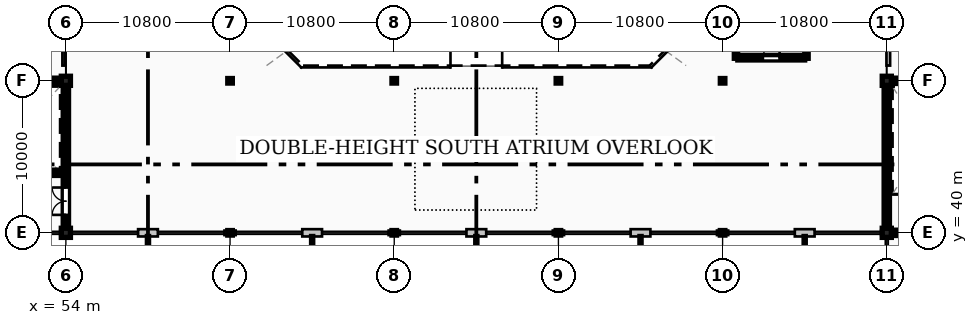
"""IFC4 building model, lengths in metres.
Left out: names, types, materials, properties, quantities, classifications, styles, units other than length and angle.
Written with IfcOpenShell. Run it as: python <this file> out.ifc"""

import sys

from ifc_helpers import new_model, si_unit, direction, frame, frame_2d, origin, origin_2d, place, context, subcontext, project, spatial, rectangle, hollow_rectangle, extrude, element, fill, save


model = new_model("IFC4")
c1 = context("Model", 3, precision=1e-05, world=origin(), true_north=direction((0.0, 1.0)))
c2 = subcontext(c1, "Body", "Model", "MODEL_VIEW")
j1 = project(units=[si_unit("LENGTHUNIT", "METRE"), si_unit("PLANEANGLEUNIT", "RADIAN")], contexts=[c1])
p1 = place(None, origin())
s1 = spatial("IfcSite", under=j1, at=p1, CompositionType="ELEMENT")
p2 = place(p1, origin())
s2 = spatial("IfcBuilding", under=s1, at=p2, CompositionType="ELEMENT")
p3 = place(p2, frame((0.0, 0.0, 14.4)))
s3 = spatial("IfcBuildingStorey", under=s2, at=p3, CompositionType="ELEMENT", Elevation=14.4)
for number, where, z_axis, x_axis in (
    (1, (54.0, 40.0, 0.0), (0.0, 0.0, 1.0), (1.0, 0.0, 0.0)),
    (2, (54.0, 50.0, 0.0), (0.0, 0.0, 1.0), (1.0, 0.0, 0.0)),
):
    element("IfcColumn", number, at=place(p3, frame(where, z_axis=z_axis, x_axis=x_axis)), inside=s3, PredefinedType="COLUMN", context=c2, shape_type="SweptSolid", body=[
        extrude(rectangle(XDim=0.6, YDim=0.6, at=origin_2d()), origin(), (0.0, 0.0, 1.0), 9.6),
    ])
for number, where, z_axis, x_axis in (
    (3, (64.8, 40.0, 0.0), (0.0, 0.0, 1.0), (1.0, 0.0, 0.0)),
    (4, (64.8, 50.0, 0.0), (0.0, 0.0, 1.0), (1.0, 0.0, 0.0)),
    (5, (75.6, 40.0, 0.0), (0.0, 0.0, 1.0), (1.0, 0.0, 0.0)),
    (6, (75.6, 50.0, 0.0), (0.0, 0.0, 1.0), (1.0, 0.0, 0.0)),
    (7, (86.4, 40.0, 0.0), (0.0, 0.0, 1.0), (1.0, 0.0, 0.0)),
    (8, (86.4, 50.0, 0.0), (0.0, 0.0, 1.0), (1.0, 0.0, 0.0)),
    (9, (97.2, 40.0, 0.0), (0.0, 0.0, 1.0), (1.0, 0.0, 0.0)),
    (10, (97.2, 50.0, 0.0), (0.0, 0.0, 1.0), (1.0, 0.0, 0.0)),
):
    element("IfcColumn", number, at=place(p3, frame(where, z_axis=z_axis, x_axis=x_axis)), inside=s3, PredefinedType="COLUMN", context=c2, shape_type="SweptSolid", body=[
        extrude(hollow_rectangle(XDim=0.3, YDim=0.3, WallThickness=0.016, InnerFilletRadius=0.016, OuterFilletRadius=0.032, at=origin_2d()), origin(), (0.0, 0.0, 1.0), 9.6),
    ])
for number, where, z_axis, x_axis in (
    (11, (108.0, 40.0, 0.0), (0.0, 0.0, 1.0), (1.0, 0.0, 0.0)),
    (12, (108.0, 50.0, 0.0), (0.0, 0.0, 1.0), (1.0, 0.0, 0.0)),
):
    element("IfcColumn", number, at=place(p3, frame(where, z_axis=z_axis, x_axis=x_axis)), inside=s3, PredefinedType="COLUMN", context=c2, shape_type="SweptSolid", body=[
        extrude(rectangle(XDim=0.6, YDim=0.6, at=origin_2d()), origin(), (0.0, 0.0, 1.0), 9.6),
    ])
for number, where, z_axis, x_axis in (
    (13, (108.0, 39.855, 0.0), (0.0, 0.0, 1.0), (0.0, -1.0, 0.0)),
    (14, (53.63, 40.0, 0.0), (0.0, 0.0, 1.0), (1.0, 0.0, 0.0)),
):
    element("IfcWall", number, at=place(p3, frame(where, z_axis=z_axis, x_axis=x_axis)), inside=s3, PredefinedType="STANDARD", context=c2, shape_type="SweptSolid", body=[
        extrude(rectangle(XDim=0.225, YDim=0.3, at=frame_2d((0.113, 0.0))), origin(), (0.0, 0.0, 1.0), 9.36),
    ])
p4 = place(p3, frame((58.75, 40.0, 0.0), z_axis=(0.0, 0.0, 1.0), x_axis=(1.0, 0.0, 0.0)))
e15 = element("IfcWall", 15, at=p4, inside=s3, PredefinedType="STANDARD", context=c2, shape_type="SweptSolid", body=[
    extrude(rectangle(XDim=1.3, YDim=0.48, at=frame_2d((0.65, 0.0))), origin(), (0.0, 0.0, 1.0), 8.96),
])
for number, where, z_axis, x_axis in (
    (16, (54.145, 40.0, 0.0), (0.0, 0.0, 1.0), (1.0, 0.0, 0.0)),
    (17, (64.43, 40.0, 0.0), (0.0, 0.0, 1.0), (1.0, 0.0, 0.0)),
):
    element("IfcWall", number, at=place(p3, frame(where, z_axis=z_axis, x_axis=x_axis)), inside=s3, PredefinedType="STANDARD", context=c2, shape_type="SweptSolid", body=[
        extrude(rectangle(XDim=0.225, YDim=0.3, at=frame_2d((0.113, 0.0))), origin(), (0.0, 0.0, 1.0), 9.36),
    ])
p5 = place(p3, frame((69.55, 40.0, 0.0), z_axis=(0.0, 0.0, 1.0), x_axis=(1.0, 0.0, 0.0)))
e18 = element("IfcWall", 18, at=p5, inside=s3, PredefinedType="STANDARD", context=c2, shape_type="SweptSolid", body=[
    extrude(rectangle(XDim=1.3, YDim=0.48, at=frame_2d((0.65, 0.0))), origin(), (0.0, 0.0, 1.0), 8.96),
])
p6 = place(p3, frame((64.945, 40.0, 0.0), z_axis=(0.0, 0.0, 1.0), x_axis=(1.0, 0.0, 0.0)))
e19 = element("IfcWall", 19, at=p6, inside=s3, PredefinedType="STANDARD", context=c2, shape_type="SweptSolid", body=[
    extrude(rectangle(XDim=0.225, YDim=0.3, at=frame_2d((0.112, 0.0))), origin(), (0.0, 0.0, 1.0), 9.36),
])
p7 = place(p3, frame((75.23, 40.0, 0.0), z_axis=(0.0, 0.0, 1.0), x_axis=(1.0, 0.0, 0.0)))
e20 = element("IfcWall", 20, at=p7, inside=s3, PredefinedType="STANDARD", context=c2, shape_type="SweptSolid", body=[
    extrude(rectangle(XDim=0.225, YDim=0.3, at=frame_2d((0.113, 0.0))), origin(), (0.0, 0.0, 1.0), 9.36),
])
p8 = place(p3, frame((80.35, 40.0, 0.0), z_axis=(0.0, 0.0, 1.0), x_axis=(1.0, 0.0, 0.0)))
e21 = element("IfcWall", 21, at=p8, inside=s3, PredefinedType="STANDARD", context=c2, shape_type="SweptSolid", body=[
    extrude(rectangle(XDim=1.3, YDim=0.48, at=frame_2d((0.65, 0.0))), origin(), (0.0, 0.0, 1.0), 8.96),
])
for number, where, z_axis, x_axis in (
    (22, (75.745, 40.0, 0.0), (0.0, 0.0, 1.0), (1.0, 0.0, 0.0)),
    (23, (86.03, 40.0, 0.0), (0.0, 0.0, 1.0), (1.0, 0.0, 0.0)),
):
    element("IfcWall", number, at=place(p3, frame(where, z_axis=z_axis, x_axis=x_axis)), inside=s3, PredefinedType="STANDARD", context=c2, shape_type="SweptSolid", body=[
        extrude(rectangle(XDim=0.225, YDim=0.3, at=frame_2d((0.112, 0.0))), origin(), (0.0, 0.0, 1.0), 9.36),
    ])
p9 = place(p3, frame((91.15, 40.0, 0.0), z_axis=(0.0, 0.0, 1.0), x_axis=(1.0, 0.0, 0.0)))
e24 = element("IfcWall", 24, at=p9, inside=s3, PredefinedType="STANDARD", context=c2, shape_type="SweptSolid", body=[
    extrude(rectangle(XDim=1.3, YDim=0.48, at=frame_2d((0.65, 0.0))), origin(), (0.0, 0.0, 1.0), 8.96),
])
p10 = place(p3, frame((86.545, 40.0, 0.0), z_axis=(0.0, 0.0, 1.0), x_axis=(1.0, 0.0, 0.0)))
e25 = element("IfcWall", 25, at=p10, inside=s3, PredefinedType="STANDARD", context=c2, shape_type="SweptSolid", body=[
    extrude(rectangle(XDim=0.225, YDim=0.3, at=frame_2d((0.113, 0.0))), origin(), (0.0, 0.0, 1.0), 9.36),
])
p11 = place(p3, frame((96.83, 40.0, 0.0), z_axis=(0.0, 0.0, 1.0), x_axis=(1.0, 0.0, 0.0)))
e26 = element("IfcWall", 26, at=p11, inside=s3, PredefinedType="STANDARD", context=c2, shape_type="SweptSolid", body=[
    extrude(rectangle(XDim=0.225, YDim=0.3, at=frame_2d((0.112, 0.0))), origin(), (0.0, 0.0, 1.0), 9.36),
])
p12 = place(p3, frame((101.95, 40.0, 0.0), z_axis=(0.0, 0.0, 1.0), x_axis=(1.0, 0.0, 0.0)))
e27 = element("IfcWall", 27, at=p12, inside=s3, PredefinedType="STANDARD", context=c2, shape_type="SweptSolid", body=[
    extrude(rectangle(XDim=1.3, YDim=0.48, at=frame_2d((0.65, 0.0))), origin(), (0.0, 0.0, 1.0), 8.96),
])
for number, where, z_axis, x_axis in (
    (28, (97.345, 40.0, 0.0), (0.0, 0.0, 1.0), (1.0, 0.0, 0.0)),
    (29, (107.63, 40.0, 0.0), (0.0, 0.0, 1.0), (1.0, 0.0, 0.0)),
):
    element("IfcWall", number, at=place(p3, frame(where, z_axis=z_axis, x_axis=x_axis)), inside=s3, PredefinedType="STANDARD", context=c2, shape_type="SweptSolid", body=[
        extrude(rectangle(XDim=0.225, YDim=0.3, at=frame_2d((0.113, 0.0))), origin(), (0.0, 0.0, 1.0), 9.36),
    ])
for number, where, z_axis, x_axis in (
    (30, (108.3, 40.0, 0.0), (0.0, 0.0, 1.0), (1.0, 0.0, 0.0)),
    (31, (108.3, 50.0, 0.0), (0.0, 0.0, 1.0), (1.0, 0.0, 0.0)),
):
    element("IfcWall", number, at=place(p3, frame(where, z_axis=z_axis, x_axis=x_axis)), inside=s3, PredefinedType="SHEAR", context=c2, shape_type="SweptSolid", body=[
        extrude(rectangle(XDim=10.2, YDim=0.35, at=frame_2d((5.1, 0.0))), origin(), (0.0, 0.0, 1.0), 9.36),
    ])
p13 = place(p3, frame((108.0, 40.3, 0.0), z_axis=(0.0, 0.0, 1.0), x_axis=(0.0, 1.0, 0.0)))
e32 = element("IfcWall", 32, at=p13, inside=s3, PredefinedType="SHEAR", context=c2, shape_type="SweptSolid", body=[
    extrude(rectangle(XDim=9.4, YDim=0.35, at=frame_2d((4.7, 0.0))), origin(), (0.0, 0.0, 1.0), 9.36),
])
p14 = place(p3, frame((43.5, 50.0, 0.0), z_axis=(0.0, 0.0, 1.0), x_axis=(1.0, 0.0, 0.0)))
e33 = element("IfcWall", 33, at=p14, inside=s3, PredefinedType="SHEAR", context=c2, shape_type="SweptSolid", body=[
    extrude(rectangle(XDim=10.2, YDim=0.35, at=frame_2d((5.1, 0.0))), origin(), (0.0, 0.0, 1.0), 9.36),
])
p15 = place(p3, frame((54.0, 40.3, 0.0), z_axis=(0.0, 0.0, 1.0), x_axis=(0.0, 1.0, 0.0)))
e34 = element("IfcWall", 34, at=p15, inside=s3, PredefinedType="SHEAR", context=c2, shape_type="SweptSolid", body=[
    extrude(rectangle(XDim=9.4, YDim=0.35, at=frame_2d((4.7, 0.0))), origin(), (0.0, 0.0, 1.0), 9.36),
])
p16 = place(p15, frame((0.88, 0.0, 0.0)))
e35 = element("IfcOpeningElement", 35, at=p16, cuts=e34, PredefinedType="OPENING", context=c2, shape_type="SweptSolid", body=[
    extrude(rectangle(XDim=1.8, YDim=2.25, at=frame_2d((0.9, 1.125))), frame((0.0, 0.185, 0.0), z_axis=(0.0, -1.0, 0.0), x_axis=(1.0, 0.0, 0.0)), (0.0, 0.0, 1.0), 0.37),
])
p17 = place(p3, frame((48.33, 43.95, 0.0), z_axis=(0.0, 0.0, 1.0), x_axis=(1.0, 0.0, 0.0)))
e36 = element("IfcWall", 36, at=p17, inside=s3, PredefinedType="SHEAR", context=c2, shape_type="SweptSolid", body=[
    extrude(rectangle(XDim=5.49, YDim=0.35, at=frame_2d((2.745, 0.0))), origin(), (0.0, 0.0, 1.0), 9.36),
])
p18 = place(p17, frame((2.1, 0.0, 0.0)))
e37 = element("IfcOpeningElement", 37, at=p18, cuts=e36, PredefinedType="OPENING", context=c2, shape_type="SweptSolid", body=[
    extrude(rectangle(XDim=1.1, YDim=2.2, at=frame_2d((0.55, 1.1))), frame((0.0, 0.185, 0.0), z_axis=(0.0, -1.0, 0.0), x_axis=(1.0, 0.0, 0.0)), (0.0, 0.0, 1.0), 0.37),
])
for number, where, z_axis, x_axis in (
    (38, (98.08, 51.48, 0.0), (0.0, 0.0, 1.0), (0.0, 1.0, 0.0)),
    (39, (102.72, 51.48, 0.0), (0.0, 0.0, 1.0), (0.0, 1.0, 0.0)),
):
    element("IfcWall", number, at=place(p3, frame(where, z_axis=z_axis, x_axis=x_axis)), inside=s3, PredefinedType="SHEAR", context=c2, shape_type="SweptSolid", body=[
        extrude(rectangle(XDim=9.79, YDim=0.22, at=frame_2d((4.895, 0.0))), origin(), (0.0, 0.0, 1.0), 9.36),
    ])
p19 = place(p3, frame((98.2, 51.48, 0.0), z_axis=(0.0, 0.0, 1.0), x_axis=(1.0, 0.0, 0.0)))
e40 = element("IfcWall", 40, at=p19, inside=s3, PredefinedType="SHEAR", context=c2, shape_type="SweptSolid", body=[
    extrude(rectangle(XDim=4.4, YDim=0.22, at=frame_2d((2.2, 0.0))), origin(), (0.0, 0.0, 1.0), 9.36),
])
p20 = place(p19, frame((1.65, 0.0, 0.0)))
e41 = element("IfcOpeningElement", 41, at=p20, cuts=e40, PredefinedType="OPENING", context=c2, shape_type="SweptSolid", body=[
    extrude(rectangle(XDim=1.1, YDim=2.2, at=frame_2d((0.55, 1.1))), frame((0.0, 0.12, 0.0), z_axis=(0.0, -1.0, 0.0), x_axis=(1.0, 0.0, 0.0)), (0.0, 0.0, 1.0), 0.24),
])
p21 = place(p3, frame((53.86, 51.0, 0.0), z_axis=(0.0, 0.0, 1.0), x_axis=(0.0, 1.0, 0.0)))
e42 = element("IfcWall", 42, at=p21, inside=s3, PredefinedType="PLUMBINGWALL", context=c2, shape_type="SweptSolid", body=[
    extrude(rectangle(XDim=4.4, YDim=0.18, at=frame_2d((2.2, 0.0))), origin(), (0.0, 0.0, 1.0), 9.32),
])
p22 = place(p21, frame((1.675, 0.0, 0.0)))
e43 = element("IfcOpeningElement", 43, at=p22, cuts=e42, PredefinedType="OPENING", context=c2, shape_type="SweptSolid", body=[
    extrude(rectangle(XDim=1.05, YDim=2.15, at=frame_2d((0.525, 1.075))), frame((0.0, 0.1, 0.0), z_axis=(0.0, -1.0, 0.0), x_axis=(1.0, 0.0, 0.0)), (0.0, 0.0, 1.0), 0.2),
])
p23 = place(p3, frame((108.1, 51.0, 0.0), z_axis=(0.0, 0.0, 1.0), x_axis=(0.0, 1.0, 0.0)))
e44 = element("IfcWall", 44, at=p23, inside=s3, PredefinedType="SOLIDWALL", context=c2, shape_type="SweptSolid", body=[
    extrude(rectangle(XDim=10.82, YDim=0.24, at=frame_2d((5.41, 0.0))), origin(), (0.0, 0.0, 1.0), 8.749),
])
p24 = place(p16, origin())
e45 = element("IfcDoor", 45, at=p24, inside=s3, OperationType="DOUBLE_DOOR_SINGLE_SWING", PredefinedType="DOOR", context=c2, shape_type="SweptSolid", body=[
    extrude(rectangle(XDim=1.8, YDim=2.25, at=frame_2d((0.9, 1.125))), frame((0.0, 0.025, 0.0), z_axis=(0.0, -1.0, 0.0), x_axis=(1.0, 0.0, 0.0)), (0.0, 0.0, 1.0), 0.05),
])
fill(e35, e45)
p25 = place(p20, origin())
e46 = element("IfcDoor", 46, at=p25, inside=s3, OperationType="SINGLE_SWING_RIGHT", PredefinedType="DOOR", context=c2, shape_type="SweptSolid", body=[
    extrude(rectangle(XDim=1.1, YDim=2.2, at=frame_2d((0.55, 1.1))), frame((0.0, 0.025, 0.0), z_axis=(0.0, -1.0, 0.0), x_axis=(1.0, 0.0, 0.0)), (0.0, 0.0, 1.0), 0.05),
])
fill(e41, e46)
save(model, sys.argv[1])
